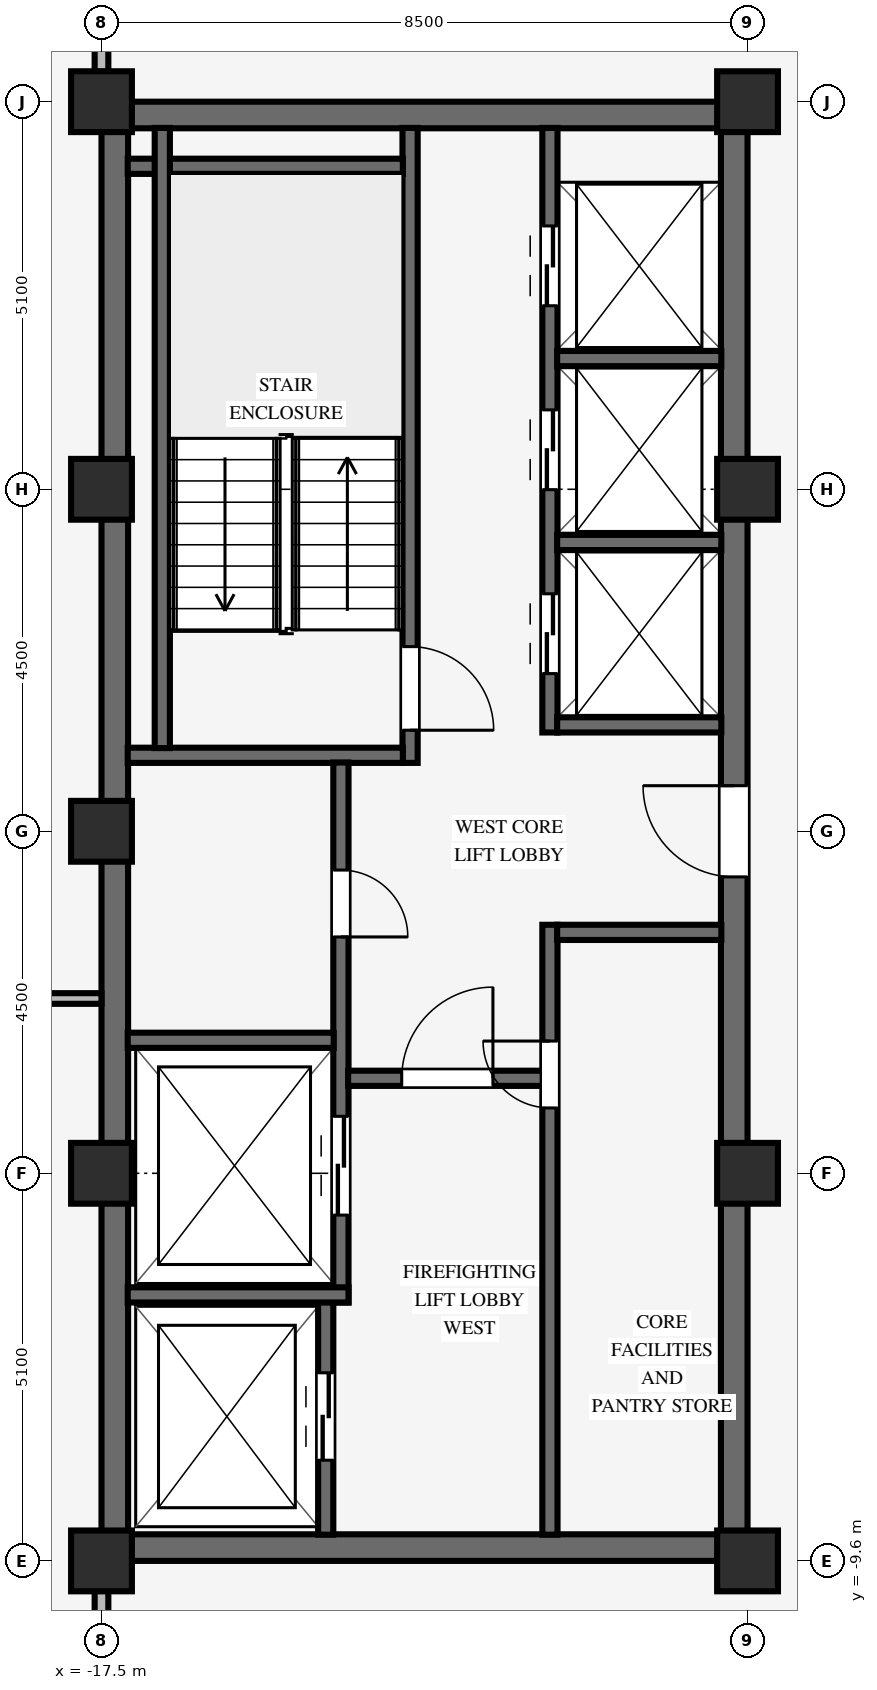
"""IFC4 building model, lengths in metres.
Left out: names, types, materials, properties, quantities, classifications, styles, units other than length and angle.
Written with IfcOpenShell. Run it as: python <this file> out.ifc"""

import sys

from ifc_helpers import new_model, si_unit, direction, frame, frame_2d, origin, origin_2d, place, context, subcontext, project, spatial, rectangle, extrude, source, transform, mapped, element, fill, save


model = new_model("IFC4")
c1 = context("Model", 3, precision=1e-05, world=origin(), true_north=direction((0.0, 1.0)))
c2 = subcontext(c1, "Body", "Model", "MODEL_VIEW")
j1 = project(units=[si_unit("LENGTHUNIT", "METRE"), si_unit("PLANEANGLEUNIT", "RADIAN")], contexts=[c1])
p1 = place(None, origin())
s1 = spatial("IfcSite", under=j1, at=p1, CompositionType="ELEMENT")
p2 = place(p1, origin())
s2 = spatial("IfcBuilding", under=s1, at=p2, CompositionType="ELEMENT")
p3 = place(p2, frame((0.0, 0.0, 234.7)))
s3 = spatial("IfcBuildingStorey", under=s2, at=p3, CompositionType="ELEMENT", Elevation=234.7)
for number, where, z_axis, x_axis in (
    (1, (-17.5, -9.425, 0.0), (0.0, 0.0, 1.0), (1.0, 0.0, 0.0)),
    (2, (-17.5, 9.425, 0.0), (0.0, 0.0, 1.0), (1.0, 0.0, 0.0)),
):
    element("IfcWall", number, at=place(p3, frame(where, z_axis=z_axis, x_axis=x_axis)), inside=s3, PredefinedType="SHEAR", context=c2, shape_type="SweptSolid", body=[
        extrude(rectangle(XDim=8.5, YDim=0.35, at=frame_2d((4.25, 0.0))), origin(), (0.0, 0.0, 1.0), 3.37),
    ])
p4 = place(p3, frame((-17.325, -9.255, 0.0), z_axis=(0.0, 0.0, 1.0), x_axis=(0.0, 1.0, 0.0)))
e3 = element("IfcWall", 3, at=p4, inside=s3, PredefinedType="SHEAR", context=c2, shape_type="SweptSolid", body=[
    extrude(rectangle(XDim=18.51, YDim=0.35, at=frame_2d((9.255, 0.0))), origin(), (0.0, 0.0, 1.0), 3.37),
])
p5 = place(p3, frame((-9.175, -9.255, 0.0), z_axis=(0.0, 0.0, 1.0), x_axis=(0.0, 1.0, 0.0)))
e4 = element("IfcWall", 4, at=p5, inside=s3, PredefinedType="SHEAR", context=c2, shape_type="SweptSolid", body=[
    extrude(rectangle(XDim=18.51, YDim=0.35, at=frame_2d((9.255, 0.0))), origin(), (0.0, 0.0, 1.0), 3.37),
])
p6 = place(p5, frame((8.655, 0.0, 0.0)))
e5 = element("IfcOpeningElement", 5, at=p6, cuts=e4, PredefinedType="OPENING", context=c2, shape_type="SweptSolid", body=[
    extrude(rectangle(XDim=1.2, YDim=2.15, at=frame_2d((0.6, 1.075))), frame((0.0, 0.185, 0.0), z_axis=(0.0, -1.0, 0.0), x_axis=(1.0, 0.0, 0.0)), (0.0, 0.0, 1.0), 0.37),
])
for number, where, z_axis, x_axis in (
    (6, (-17.5, -9.6, 0.0), (0.0, 0.0, 1.0), (1.0, 0.0, 0.0)),
    (7, (-17.5, -4.5, 0.0), (0.0, 0.0, 1.0), (1.0, 0.0, 0.0)),
    (8, (-17.5, 4.5, 0.0), (0.0, 0.0, 1.0), (1.0, 0.0, 0.0)),
    (9, (-17.5, 9.6, 0.0), (0.0, 0.0, 1.0), (1.0, 0.0, 0.0)),
    (10, (-9.0, -9.6, 0.0), (0.0, 0.0, 1.0), (1.0, 0.0, 0.0)),
    (11, (-9.0, -4.5, 0.0), (0.0, 0.0, 1.0), (1.0, 0.0, 0.0)),
    (12, (-9.0, 4.5, 0.0), (0.0, 0.0, 1.0), (1.0, 0.0, 0.0)),
    (13, (-9.0, 9.6, 0.0), (0.0, 0.0, 1.0), (1.0, 0.0, 0.0)),
    (14, (-17.5, 0.0, 0.0), (0.0, 0.0, 1.0), (1.0, 0.0, 0.0)),
):
    element("IfcColumn", number, at=place(p3, frame(where, z_axis=z_axis, x_axis=x_axis)), inside=s3, PredefinedType="COLUMN", context=c2, shape_type="SweptSolid", body=[
        extrude(rectangle(XDim=0.8, YDim=0.8, at=origin_2d()), origin(), (0.0, 0.0, 1.0), 3.37),
    ])
p7 = place(p3, frame((-13.44, 0.9, 0.0), z_axis=(0.0, 0.0, 1.0), x_axis=(0.0, 1.0, 0.0)))
e15 = element("IfcWall", 15, at=p7, inside=s3, PredefinedType="SHEAR", context=c2, shape_type="SweptSolid", body=[
    extrude(rectangle(XDim=8.355, YDim=0.2, at=frame_2d((4.177, 0.0))), origin(), (0.0, 0.0, 1.0), 3.37),
])
p8 = place(p7, frame((1.53, 0.0, 0.0), z_axis=(0.0, 0.0, 1.0), x_axis=(-1.0, 0.0, 0.0)))
e16 = element("IfcOpeningElement", 16, at=p8, cuts=e15, PredefinedType="OPENING", context=c2, shape_type="SweptSolid", body=[
    extrude(rectangle(XDim=1.1, YDim=2.15, at=frame_2d((0.55, 1.075))), frame((0.0, 0.11, 0.0), z_axis=(0.0, -1.0, 0.0), x_axis=(1.0, 0.0, 0.0)), (0.0, 0.0, 1.0), 0.22),
])
for number, where, z_axis, x_axis in (
    (17, (-17.155, 1.0, 0.0), (0.0, 0.0, 1.0), (1.0, 0.0, 0.0)),
    (18, (-17.155, 8.75, 0.0), (0.0, 0.0, 1.0), (1.0, 0.0, 0.0)),
):
    element("IfcWall", number, at=place(p3, frame(where, z_axis=z_axis, x_axis=x_axis)), inside=s3, PredefinedType="SHEAR", context=c2, shape_type="SweptSolid", body=[
        extrude(rectangle(XDim=3.62, YDim=0.2, at=frame_2d((1.81, 0.0))), origin(), (0.0, 0.0, 1.0), 3.37),
    ])
p9 = place(p3, frame((-16.7, 1.095, 0.0), z_axis=(0.0, 0.0, 1.0), x_axis=(0.0, 1.0, 0.0)))
e19 = element("IfcWall", 19, at=p9, inside=s3, PredefinedType="SHEAR", context=c2, shape_type="SweptSolid", body=[
    extrude(rectangle(XDim=8.16, YDim=0.2, at=frame_2d((4.08, 0.0))), origin(), (0.0, 0.0, 1.0), 3.37),
])
p10 = place(p3, frame((-14.55, -9.255, 0.0), z_axis=(0.0, 0.0, 1.0), x_axis=(0.0, 1.0, 0.0)))
e20 = element("IfcWall", 20, at=p10, inside=s3, PredefinedType="SHEAR", context=c2, shape_type="SweptSolid", body=[
    extrude(rectangle(XDim=3.06, YDim=0.2, at=frame_2d((1.53, 0.0))), origin(), (0.0, 0.0, 1.0), 3.37),
])
p11 = place(p10, frame((0.98, 0.0, 0.0)))
e21 = element("IfcOpeningElement", 21, at=p11, cuts=e20, PredefinedType="OPENING", context=c2, shape_type="SweptSolid", body=[
    extrude(rectangle(XDim=1.15, YDim=2.15, at=frame_2d((0.575, 1.075))), frame((0.0, 0.11, 0.0), z_axis=(0.0, -1.0, 0.0), x_axis=(1.0, 0.0, 0.0)), (0.0, 0.0, 1.0), 0.22),
])
p12 = place(p3, frame((-14.35, -6.2, 0.0), z_axis=(0.0, 0.0, 1.0), x_axis=(0.0, 1.0, 0.0)))
e22 = element("IfcWall", 22, at=p12, inside=s3, PredefinedType="SHEAR", context=c2, shape_type="SweptSolid", body=[
    extrude(rectangle(XDim=7.105, YDim=0.2, at=frame_2d((3.552, 0.0))), origin(), (0.0, 0.0, 1.0), 3.37),
])
p13 = place(p12, frame((5.69, 0.0, 0.0), z_axis=(0.0, 0.0, 1.0), x_axis=(-1.0, 0.0, 0.0)))
e23 = element("IfcOpeningElement", 23, at=p13, cuts=e22, PredefinedType="OPENING", context=c2, shape_type="SweptSolid", body=[
    extrude(rectangle(XDim=0.88, YDim=2.1, at=frame_2d((0.44, 1.05))), frame((0.0, 0.11, 0.0), z_axis=(0.0, -1.0, 0.0), x_axis=(1.0, 0.0, 0.0)), (0.0, 0.0, 1.0), 0.22),
])
p14 = place(p12, frame((1.15, 0.0, 0.0)))
e24 = element("IfcOpeningElement", 24, at=p14, cuts=e22, PredefinedType="OPENING", context=c2, shape_type="SweptSolid", body=[
    extrude(rectangle(XDim=1.3, YDim=2.2, at=frame_2d((0.65, 1.1))), frame((0.0, 0.11, 0.0), z_axis=(0.0, -1.0, 0.0), x_axis=(1.0, 0.0, 0.0)), (0.0, 0.0, 1.0), 0.22),
])
p15 = place(p3, frame((-17.155, -6.1, 0.0), z_axis=(0.0, 0.0, 1.0), x_axis=(1.0, 0.0, 0.0)))
e25 = element("IfcWall", 25, at=p15, inside=s3, PredefinedType="SHEAR", context=c2, shape_type="SweptSolid", body=[
    extrude(rectangle(XDim=2.905, YDim=0.2, at=frame_2d((1.453, 0.0))), origin(), (0.0, 0.0, 1.0), 3.37),
])
p16 = place(p3, frame((-17.155, -2.75, 0.0), z_axis=(0.0, 0.0, 1.0), x_axis=(1.0, 0.0, 0.0)))
e26 = element("IfcWall", 26, at=p16, inside=s3, PredefinedType="SHEAR", context=c2, shape_type="SweptSolid", body=[
    extrude(rectangle(XDim=2.71, YDim=0.2, at=frame_2d((1.355, 0.0))), origin(), (0.0, 0.0, 1.0), 3.37),
])
p17 = place(p3, frame((-11.6, -9.255, 0.0), z_axis=(0.0, 0.0, 1.0), x_axis=(0.0, 1.0, 0.0)))
e27 = element("IfcWall", 27, at=p17, inside=s3, PredefinedType="SHEAR", context=c2, shape_type="SweptSolid", body=[
    extrude(rectangle(XDim=8.025, YDim=0.2, at=frame_2d((4.012, 0.0))), origin(), (0.0, 0.0, 1.0), 3.37),
])
p18 = place(p17, frame((5.615, 0.0, 0.0)))
e28 = element("IfcOpeningElement", 28, at=p18, cuts=e27, PredefinedType="OPENING", context=c2, shape_type="SweptSolid", body=[
    extrude(rectangle(XDim=0.88, YDim=2.1, at=frame_2d((0.44, 1.05))), frame((0.0, 0.11, 0.0), z_axis=(0.0, -1.0, 0.0), x_axis=(1.0, 0.0, 0.0)), (0.0, 0.0, 1.0), 0.22),
])
p19 = place(p3, frame((-14.255, -3.25, 0.0), z_axis=(0.0, 0.0, 1.0), x_axis=(1.0, 0.0, 0.0)))
e29 = element("IfcWall", 29, at=p19, inside=s3, PredefinedType="SHEAR", context=c2, shape_type="SweptSolid", body=[
    extrude(rectangle(XDim=2.56, YDim=0.2, at=frame_2d((1.28, 0.0))), origin(), (0.0, 0.0, 1.0), 3.37),
])
p20 = place(p19, frame((0.705, 0.0, 0.0)))
e30 = element("IfcOpeningElement", 30, at=p20, cuts=e29, PredefinedType="OPENING", context=c2, shape_type="SweptSolid", body=[
    extrude(rectangle(XDim=1.2, YDim=2.15, at=frame_2d((0.6, 1.075))), frame((0.0, 0.11, 0.0), z_axis=(0.0, -1.0, 0.0), x_axis=(1.0, 0.0, 0.0)), (0.0, 0.0, 1.0), 0.22),
])
p21 = place(p3, frame((-11.505, -1.33, 0.0), z_axis=(0.0, 0.0, 1.0), x_axis=(1.0, 0.0, 0.0)))
e31 = element("IfcWall", 31, at=p21, inside=s3, PredefinedType="SHEAR", context=c2, shape_type="SweptSolid", body=[
    extrude(rectangle(XDim=2.16, YDim=0.2, at=frame_2d((1.08, 0.0))), origin(), (0.0, 0.0, 1.0), 3.37),
])
p22 = place(p3, frame((-11.6, 1.3, 0.0), z_axis=(0.0, 0.0, 1.0), x_axis=(0.0, 1.0, 0.0)))
e32 = element("IfcWall", 32, at=p22, inside=s3, PredefinedType="SHEAR", context=c2, shape_type="SweptSolid", body=[
    extrude(rectangle(XDim=7.955, YDim=0.2, at=frame_2d((3.978, 0.0))), origin(), (0.0, 0.0, 1.0), 3.37),
])
p23 = place(p22, frame((0.775, 0.0, 0.0)))
e33 = element("IfcOpeningElement", 33, at=p23, cuts=e32, PredefinedType="OPENING", context=c2, shape_type="SweptSolid", body=[
    extrude(rectangle(XDim=1.05, YDim=2.15, at=frame_2d((0.525, 1.075))), frame((0.0, 0.11, 0.0), z_axis=(0.0, -1.0, 0.0), x_axis=(1.0, 0.0, 0.0)), (0.0, 0.0, 1.0), 0.22),
])
p24 = place(p22, frame((3.195, 0.0, 0.0)))
e34 = element("IfcOpeningElement", 34, at=p24, cuts=e32, PredefinedType="OPENING", context=c2, shape_type="SweptSolid", body=[
    extrude(rectangle(XDim=1.05, YDim=2.15, at=frame_2d((0.525, 1.075))), frame((0.0, 0.11, 0.0), z_axis=(0.0, -1.0, 0.0), x_axis=(1.0, 0.0, 0.0)), (0.0, 0.0, 1.0), 0.22),
])
p25 = place(p22, frame((5.615, 0.0, 0.0)))
e35 = element("IfcOpeningElement", 35, at=p25, cuts=e32, PredefinedType="OPENING", context=c2, shape_type="SweptSolid", body=[
    extrude(rectangle(XDim=1.05, YDim=2.15, at=frame_2d((0.525, 1.075))), frame((0.0, 0.11, 0.0), z_axis=(0.0, -1.0, 0.0), x_axis=(1.0, 0.0, 0.0)), (0.0, 0.0, 1.0), 0.22),
])
for number, where, z_axis, x_axis in (
    (36, (-11.505, 1.4, 0.0), (0.0, 0.0, 1.0), (1.0, 0.0, 0.0)),
    (37, (-11.505, 3.8, 0.0), (0.0, 0.0, 1.0), (1.0, 0.0, 0.0)),
    (38, (-11.505, 6.22, 0.0), (0.0, 0.0, 1.0), (1.0, 0.0, 0.0)),
):
    element("IfcWall", number, at=place(p3, frame(where, z_axis=z_axis, x_axis=x_axis)), inside=s3, PredefinedType="SHEAR", context=c2, shape_type="SweptSolid", body=[
        extrude(rectangle(XDim=2.16, YDim=0.2, at=frame_2d((1.08, 0.0))), origin(), (0.0, 0.0, 1.0), 3.37),
    ])
p26 = place(p3, frame((-26.1, -2.2, 0.0), z_axis=(0.0, 0.0, 1.0), x_axis=(1.0, 0.0, 0.0)))
e39 = element("IfcWall", 39, at=p26, inside=s3, PredefinedType="PARTITIONING", context=c2, shape_type="SweptSolid", body=[
    extrude(rectangle(XDim=8.6, YDim=0.14, at=frame_2d((4.3, 0.0))), origin(), (0.0, 0.0, 1.0), 3.36),
])
for number, where, z_axis, x_axis in (
    (40, (-17.5, -11.114, 0.0), (0.0, 0.0, 1.0), (0.0, 1.0, 0.0)),
    (41, (-17.5, 9.996, 0.0), (0.0, 0.0, 1.0), (0.0, 1.0, 0.0)),
):
    element("IfcWall", number, at=place(p3, frame(where, z_axis=z_axis, x_axis=x_axis)), inside=s3, PredefinedType="PARTITIONING", context=c2, shape_type="SweptSolid", body=[
        extrude(rectangle(XDim=1.118, YDim=0.18, at=frame_2d((0.559, 0.0))), origin(), (0.0, 0.0, 1.0), 2.892),
    ])
m1 = source(origin(), c2, "Body", "SweptSolid", [
    extrude(rectangle(XDim=1.1, YDim=2.15, at=frame_2d((0.55, 1.075))), frame((0.0, 0.025, 0.0), z_axis=(0.0, -1.0, 0.0), x_axis=(1.0, 0.0, 0.0)), (0.0, 0.0, 1.0), 0.05),
])
p27 = place(p8, origin())
e42 = element("IfcDoor", 42, at=p27, inside=s3, OperationType="SINGLE_SWING_RIGHT", PredefinedType="DOOR", context=c2, shape_type="MappedRepresentation", body=[
    mapped(m1, transform((0.0, 0.0, 0.0), scale=1.0)),
])
fill(e16, e42)
m2 = source(origin(), c2, "Body", "SweptSolid", [
    extrude(rectangle(XDim=0.88, YDim=2.1, at=frame_2d((0.44, 1.05))), frame((0.0, 0.025, 0.0), z_axis=(0.0, -1.0, 0.0), x_axis=(1.0, 0.0, 0.0)), (0.0, 0.0, 1.0), 0.05),
])
p28 = place(p13, origin())
e43 = element("IfcDoor", 43, at=p28, inside=s3, OperationType="SINGLE_SWING_RIGHT", PredefinedType="DOOR", context=c2, shape_type="MappedRepresentation", body=[
    mapped(m2, transform((0.0, 0.0, 0.0), scale=1.0)),
])
fill(e23, e43)
m3 = source(origin(), c2, "Body", "SweptSolid", [
    extrude(rectangle(XDim=1.2, YDim=2.15, at=frame_2d((0.6, 1.075))), frame((0.0, 0.025, 0.0), z_axis=(0.0, -1.0, 0.0), x_axis=(1.0, 0.0, 0.0)), (0.0, 0.0, 1.0), 0.05),
])
p29 = place(p20, origin())
e44 = element("IfcDoor", 44, at=p29, inside=s3, OperationType="SINGLE_SWING_RIGHT", PredefinedType="DOOR", context=c2, shape_type="MappedRepresentation", body=[
    mapped(m3, transform((0.0, 0.0, 0.0), scale=1.0)),
])
fill(e30, e44)
p30 = place(p18, origin())
e45 = element("IfcDoor", 45, at=p30, inside=s3, OperationType="SINGLE_SWING_RIGHT", PredefinedType="DOOR", context=c2, shape_type="MappedRepresentation", body=[
    mapped(m2, transform((0.0, 0.0, 0.0), scale=1.0)),
])
fill(e28, e45)
p31 = place(p6, origin())
e46 = element("IfcDoor", 46, at=p31, inside=s3, OperationType="SINGLE_SWING_RIGHT", PredefinedType="DOOR", context=c2, shape_type="MappedRepresentation", body=[
    mapped(m3, transform((0.0, 0.0, 0.0), scale=1.0)),
])
fill(e5, e46)
m4 = source(origin(), c2, "Body", "SweptSolid", [
    extrude(rectangle(XDim=1.15, YDim=2.15, at=frame_2d((0.575, 1.075))), frame((0.0, 0.025, 0.0), z_axis=(0.0, -1.0, 0.0), x_axis=(1.0, 0.0, 0.0)), (0.0, 0.0, 1.0), 0.05),
])
p32 = place(p11, origin())
e47 = element("IfcDoor", 47, at=p32, inside=s3, OperationType="DOUBLE_DOOR_SLIDING", PredefinedType="DOOR", context=c2, shape_type="MappedRepresentation", body=[
    mapped(m4, transform((0.0, 0.0, 0.0), scale=1.0)),
])
fill(e21, e47)
m5 = source(origin(), c2, "Body", "SweptSolid", [
    extrude(rectangle(XDim=1.3, YDim=2.2, at=frame_2d((0.65, 1.1))), frame((0.0, 0.025, 0.0), z_axis=(0.0, -1.0, 0.0), x_axis=(1.0, 0.0, 0.0)), (0.0, 0.0, 1.0), 0.05),
])
p33 = place(p14, origin())
e48 = element("IfcDoor", 48, at=p33, inside=s3, OperationType="DOUBLE_DOOR_SLIDING", PredefinedType="DOOR", context=c2, shape_type="MappedRepresentation", body=[
    mapped(m5, transform((0.0, 0.0, 0.0), scale=1.0)),
])
fill(e24, e48)
m6 = source(origin(), c2, "Body", "SweptSolid", [
    extrude(rectangle(XDim=1.05, YDim=2.15, at=frame_2d((0.525, 1.075))), frame((0.0, 0.025, 0.0), z_axis=(0.0, -1.0, 0.0), x_axis=(1.0, 0.0, 0.0)), (0.0, 0.0, 1.0), 0.05),
])
p34 = place(p23, origin())
e49 = element("IfcDoor", 49, at=p34, inside=s3, OperationType="DOUBLE_DOOR_SLIDING", PredefinedType="DOOR", context=c2, shape_type="MappedRepresentation", body=[
    mapped(m6, transform((0.0, 0.0, 0.0), scale=1.0)),
])
fill(e33, e49)
p35 = place(p24, origin())
e50 = element("IfcDoor", 50, at=p35, inside=s3, OperationType="DOUBLE_DOOR_SLIDING", PredefinedType="DOOR", context=c2, shape_type="MappedRepresentation", body=[
    mapped(m6, transform((0.0, 0.0, 0.0), scale=1.0)),
])
fill(e34, e50)
p36 = place(p25, origin())
e51 = element("IfcDoor", 51, at=p36, inside=s3, OperationType="DOUBLE_DOOR_SLIDING", PredefinedType="DOOR", context=c2, shape_type="MappedRepresentation", body=[
    mapped(m6, transform((0.0, 0.0, 0.0), scale=1.0)),
])
fill(e35, e51)
save(model, sys.argv[1])
